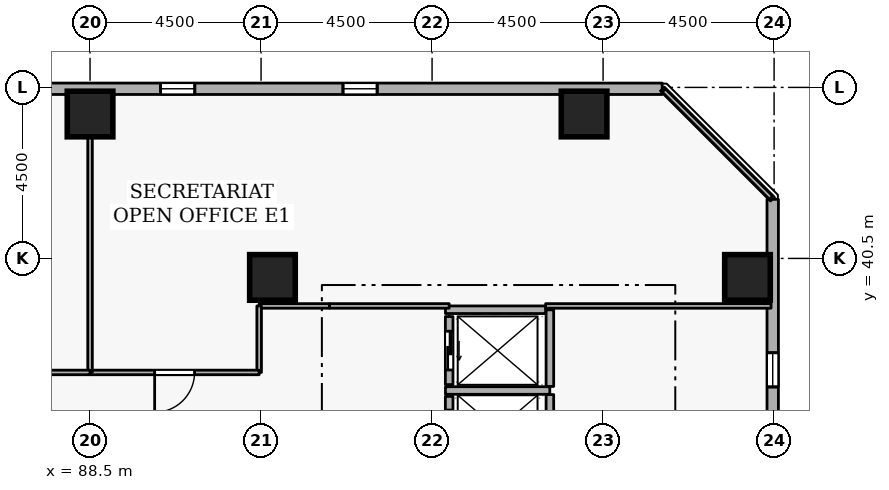
"""IFC4 building model, lengths in metres.
Left out: names, types, materials, properties, quantities, classifications, styles, units other than length and angle.
Written with IfcOpenShell. Run it as: python <this file> out.ifc"""

import sys

from ifc_helpers import new_model, si_unit, direction, frame, frame_2d, origin, origin_2d, place, context, subcontext, project, spatial, rectangle, extrude, element, fill, save


model = new_model("IFC4")
c1 = context("Model", 3, precision=1e-05, world=origin(), true_north=direction((0.0, 1.0)))
c2 = subcontext(c1, "Body", "Model", "MODEL_VIEW")
j1 = project(units=[si_unit("LENGTHUNIT", "METRE"), si_unit("PLANEANGLEUNIT", "RADIAN")], contexts=[c1])
p1 = place(None, origin())
s1 = spatial("IfcSite", under=j1, at=p1, CompositionType="ELEMENT")
p2 = place(p1, origin())
s2 = spatial("IfcBuilding", under=s1, at=p2, CompositionType="ELEMENT")
p3 = place(p2, frame((0.0, 0.0, 112.5)))
s3 = spatial("IfcBuildingStorey", under=s2, at=p3, CompositionType="ELEMENT", Elevation=112.5)
for number, where, z_axis, x_axis in (
    (1, (105.8, 40.0, 0.0), (0.0, 0.0, 1.0), (1.0, 0.0, 0.0)),
    (2, (101.5, 44.3, 0.0), (0.0, 0.0, 1.0), (1.0, 0.0, 0.0)),
    (3, (88.5, 44.3, 0.0), (0.0, 0.0, 1.0), (1.0, 0.0, 0.0)),
    (4, (93.3, 40.0, 0.0), (0.0, 0.0, 1.0), (1.0, 0.0, 0.0)),
):
    element("IfcColumn", number, at=place(p3, frame(where, z_axis=z_axis, x_axis=x_axis)), inside=s3, PredefinedType="COLUMN", context=c2, shape_type="SweptSolid", body=[
        extrude(rectangle(XDim=1.2, YDim=1.2, at=origin_2d()), origin(), (0.0, 0.0, 1.0), 3.6),
    ])
p4 = place(p3, frame((106.465, 5.619, 0.0), z_axis=(0.0, 0.0, 1.0), x_axis=(-2.6801568e-05, 0.999999999641, 0.0)))
e5 = element("IfcWall", 5, at=p4, inside=s3, PredefinedType="STANDARD", context=c2, shape_type="SweptSolid", body=[
    extrude(rectangle(XDim=36.437, YDim=0.3, at=frame_2d((18.218, 0.0))), origin(), (0.0, 0.0, 1.0), 2.7),
])
p5 = place(p4, frame((2.7, 0.0, 0.72)))
e6 = element("IfcOpeningElement", 6, at=p5, cuts=e5, PredefinedType="OPENING", context=c2, shape_type="SweptSolid", body=[
    extrude(rectangle(XDim=0.9, YDim=1.75, at=frame_2d((0.45, 0.875))), frame((0.0, 0.16, 0.0), z_axis=(0.0, -1.0, 0.0), x_axis=(1.0, 0.0, 0.0)), (0.0, 0.0, 1.0), 0.32),
])
p6 = place(p4, frame((12.3, 0.0, 0.72)))
e7 = element("IfcOpeningElement", 7, at=p6, cuts=e5, PredefinedType="OPENING", context=c2, shape_type="SweptSolid", body=[
    extrude(rectangle(XDim=0.9, YDim=1.75, at=frame_2d((0.45, 0.875))), frame((0.0, 0.16, 0.0), z_axis=(0.0, -1.0, 0.0), x_axis=(1.0, 0.0, 0.0)), (0.0, 0.0, 1.0), 0.32),
])
p7 = place(p4, frame((17.1, 0.0, 0.72)))
e8 = element("IfcOpeningElement", 8, at=p7, cuts=e5, PredefinedType="OPENING", context=c2, shape_type="SweptSolid", body=[
    extrude(rectangle(XDim=0.9, YDim=1.75, at=frame_2d((0.45, 0.875))), frame((0.0, 0.16, 0.0), z_axis=(0.0, -1.0, 0.0), x_axis=(1.0, 0.0, 0.0)), (0.0, 0.0, 1.0), 0.32),
])
p8 = place(p4, frame((26.7, 0.0, 0.72)))
e9 = element("IfcOpeningElement", 9, at=p8, cuts=e5, PredefinedType="OPENING", context=c2, shape_type="SweptSolid", body=[
    extrude(rectangle(XDim=0.9, YDim=1.75, at=frame_2d((0.45, 0.875))), frame((0.0, 0.16, 0.0), z_axis=(0.0, -1.0, 0.0), x_axis=(1.0, 0.0, 0.0)), (0.0, 0.0, 1.0), 0.32),
])
p9 = place(p4, frame((31.5, 0.0, 0.72)))
e10 = element("IfcOpeningElement", 10, at=p9, cuts=e5, PredefinedType="OPENING", context=c2, shape_type="SweptSolid", body=[
    extrude(rectangle(XDim=0.9, YDim=1.75, at=frame_2d((0.45, 0.875))), frame((0.0, 0.16, 0.0), z_axis=(0.0, -1.0, 0.0), x_axis=(1.0, 0.0, 0.0)), (0.0, 0.0, 1.0), 0.32),
])
p10 = place(p3, frame((103.555, 44.964, 0.0), z_axis=(0.0, 0.0, 1.0), x_axis=(-0.999999999641, 2.6801568e-05, 0.0)))
e11 = element("IfcWall", 11, at=p10, inside=s3, PredefinedType="STANDARD", context=c2, shape_type="SweptSolid", body=[
    extrude(rectangle(XDim=36.437, YDim=0.3, at=frame_2d((18.218, 0.0))), origin(), (0.0, 0.0, 1.0), 2.7),
])
p11 = place(p10, frame((7.5, 0.0, 0.72)))
e12 = element("IfcOpeningElement", 12, at=p11, cuts=e11, PredefinedType="OPENING", context=c2, shape_type="SweptSolid", body=[
    extrude(rectangle(XDim=0.9, YDim=1.75, at=frame_2d((0.45, 0.875))), frame((0.0, 0.16, 0.0), z_axis=(0.0, -1.0, 0.0), x_axis=(1.0, 0.0, 0.0)), (0.0, 0.0, 1.0), 0.32),
])
p12 = place(p10, frame((12.3, 0.0, 0.72)))
e13 = element("IfcOpeningElement", 13, at=p12, cuts=e11, PredefinedType="OPENING", context=c2, shape_type="SweptSolid", body=[
    extrude(rectangle(XDim=0.9, YDim=1.75, at=frame_2d((0.45, 0.875))), frame((0.0, 0.16, 0.0), z_axis=(0.0, -1.0, 0.0), x_axis=(1.0, 0.0, 0.0)), (0.0, 0.0, 1.0), 0.32),
])
p13 = place(p10, frame((21.9, 0.0, 0.72)))
e14 = element("IfcOpeningElement", 14, at=p13, cuts=e11, PredefinedType="OPENING", context=c2, shape_type="SweptSolid", body=[
    extrude(rectangle(XDim=0.9, YDim=1.75, at=frame_2d((0.45, 0.875))), frame((0.0, 0.16, 0.0), z_axis=(0.0, -1.0, 0.0), x_axis=(1.0, 0.0, 0.0)), (0.0, 0.0, 1.0), 0.32),
])
p14 = place(p10, frame((31.5, 0.0, 0.72)))
e15 = element("IfcOpeningElement", 15, at=p14, cuts=e11, PredefinedType="OPENING", context=c2, shape_type="SweptSolid", body=[
    extrude(rectangle(XDim=0.9, YDim=1.75, at=frame_2d((0.45, 0.875))), frame((0.0, 0.16, 0.0), z_axis=(0.0, -1.0, 0.0), x_axis=(1.0, 0.0, 0.0)), (0.0, 0.0, 1.0), 0.32),
])
p15 = place(p3, frame((97.95, 36.87, 0.0), z_axis=(0.0, 0.0, 1.0), x_axis=(0.0, -1.0, 0.0)))
e16 = element("IfcWall", 16, at=p15, inside=s3, PredefinedType="STANDARD", context=c2, shape_type="SweptSolid", body=[
    extrude(rectangle(XDim=1.74, YDim=0.2, at=frame_2d((0.87, 0.0))), origin(), (0.0, 0.0, 1.0), 3.34),
])
p16 = place(p15, frame((0.36, 0.0, 0.0)))
e17 = element("IfcOpeningElement", 17, at=p16, cuts=e16, PredefinedType="OPENING", context=c2, shape_type="SweptSolid", body=[
    extrude(rectangle(XDim=1.02, YDim=2.06, at=frame_2d((0.51, 1.03))), frame((0.0, 0.11, 0.0), z_axis=(0.0, -1.0, 0.0), x_axis=(1.0, 0.0, 0.0)), (0.0, 0.0, 1.0), 0.22),
])
p17 = place(p3, frame((97.95, 38.97, 0.0), z_axis=(0.0, 0.0, 1.0), x_axis=(0.0, -1.0, 0.0)))
e18 = element("IfcWall", 18, at=p17, inside=s3, PredefinedType="STANDARD", context=c2, shape_type="SweptSolid", body=[
    extrude(rectangle(XDim=1.79, YDim=0.2, at=frame_2d((0.895, 0.0))), origin(), (0.0, 0.0, 1.0), 3.34),
])
p18 = place(p17, frame((0.385, 0.0, 0.0)))
e19 = element("IfcOpeningElement", 19, at=p18, cuts=e18, PredefinedType="OPENING", context=c2, shape_type="SweptSolid", body=[
    extrude(rectangle(XDim=1.02, YDim=2.06, at=frame_2d((0.51, 1.03))), frame((0.0, 0.11, 0.0), z_axis=(0.0, -1.0, 0.0), x_axis=(1.0, 0.0, 0.0)), (0.0, 0.0, 1.0), 0.22),
])
p19 = place(p3, frame((97.852, 37.025, 0.0), z_axis=(0.0, 0.0, 1.0), x_axis=(1.0, 0.0, 0.0)))
e20 = element("IfcWall", 20, at=p19, inside=s3, PredefinedType="STANDARD", context=c2, shape_type="SweptSolid", body=[
    extrude(rectangle(XDim=2.746, YDim=0.2, at=frame_2d((1.373, 0.0))), origin(), (0.0, 0.0, 1.0), 3.34),
])
p20 = place(p3, frame((100.6, 35.062, 0.0), z_axis=(0.0, 0.0, 1.0), x_axis=(0.0, 1.0, 0.0)))
e21 = element("IfcWall", 21, at=p20, inside=s3, PredefinedType="STANDARD", context=c2, shape_type="SweptSolid", body=[
    extrude(rectangle(XDim=1.856, YDim=0.2, at=frame_2d((0.928, 0.0))), origin(), (0.0, 0.0, 1.0), 3.34),
])
p21 = place(p3, frame((100.6, 37.132, 0.0), z_axis=(0.0, 0.0, 1.0), x_axis=(0.0, 1.0, 0.0)))
e22 = element("IfcWall", 22, at=p21, inside=s3, PredefinedType="STANDARD", context=c2, shape_type="SweptSolid", body=[
    extrude(rectangle(XDim=2.016, YDim=0.2, at=frame_2d((1.008, 0.0))), origin(), (0.0, 0.0, 1.0), 3.34),
])
p22 = place(p3, frame((97.852, 39.15, 0.0), z_axis=(0.0, 0.0, 1.0), x_axis=(1.0, 0.0, 0.0)))
e23 = element("IfcWall", 23, at=p22, inside=s3, PredefinedType="STANDARD", context=c2, shape_type="SweptSolid", body=[
    extrude(rectangle(XDim=2.636, YDim=0.2, at=frame_2d((1.318, 0.0))), origin(), (0.0, 0.0, 1.0), 3.34),
])
p23 = place(p3, frame((106.42, 39.25, 0.0), z_axis=(0.0, 0.0, 1.0), x_axis=(-1.0, 0.0, 0.0)))
e24 = element("IfcWall", 24, at=p23, inside=s3, PredefinedType="PARTITIONING", context=c2, shape_type="SweptSolid", body=[
    extrude(rectangle(XDim=5.932, YDim=0.12, at=frame_2d((2.966, 0.0))), origin(), (0.0, 0.0, 1.0), 3.34),
])
p24 = place(p3, frame((97.95, 39.25, 0.0), z_axis=(0.0, 0.0, 1.0), x_axis=(-1.0, 0.0, 0.0)))
e25 = element("IfcWall", 25, at=p24, inside=s3, PredefinedType="PARTITIONING", context=c2, shape_type="SweptSolid", body=[
    extrude(rectangle(XDim=3.15, YDim=0.12, at=frame_2d((1.575, 0.0))), origin(), (0.0, 0.0, 1.0), 3.34),
])
p25 = place(p3, frame((94.8, 39.25, 0.0), z_axis=(0.0, 0.0, 1.0), x_axis=(-1.0, 0.0, 0.0)))
e26 = element("IfcWall", 26, at=p25, inside=s3, PredefinedType="PARTITIONING", context=c2, shape_type="SweptSolid", body=[
    extrude(rectangle(XDim=1.85, YDim=0.12, at=frame_2d((0.925, 0.0))), origin(), (0.0, 0.0, 1.0), 3.34),
])
p26 = place(p3, frame((92.95, 39.25, 0.0), z_axis=(0.0, 0.0, 1.0), x_axis=(0.0, -1.0, 0.0)))
e27 = element("IfcWall", 27, at=p26, inside=s3, PredefinedType="PARTITIONING", context=c2, shape_type="SweptSolid", body=[
    extrude(rectangle(XDim=1.75, YDim=0.12, at=frame_2d((0.875, 0.0))), origin(), (0.0, 0.0, 1.0), 3.34),
])
p27 = place(p3, frame((92.95, 37.5, 0.0), z_axis=(0.0, 0.0, 1.0), x_axis=(-1.0, 0.0, 0.0)))
e28 = element("IfcWall", 28, at=p27, inside=s3, PredefinedType="PARTITIONING", context=c2, shape_type="SweptSolid", body=[
    extrude(rectangle(XDim=4.45, YDim=0.12, at=frame_2d((2.225, 0.0))), origin(), (0.0, 0.0, 1.0), 3.34),
])
p28 = place(p27, frame((1.7, 0.0, 0.0)))
e29 = element("IfcOpeningElement", 29, at=p28, cuts=e28, PredefinedType="OPENING", context=c2, shape_type="SweptSolid", body=[
    extrude(rectangle(XDim=1.05, YDim=2.1, at=frame_2d((0.525, 1.05))), frame((0.0, 0.07, 0.0), z_axis=(0.0, -1.0, 0.0), x_axis=(1.0, 0.0, 0.0)), (0.0, 0.0, 1.0), 0.14),
])
p29 = place(p3, frame((88.5, 37.5, 0.0), z_axis=(0.0, 0.0, 1.0), x_axis=(0.0, 1.0, 0.0)))
e30 = element("IfcWall", 30, at=p29, inside=s3, PredefinedType="PARTITIONING", context=c2, shape_type="SweptSolid", body=[
    extrude(rectangle(XDim=7.42, YDim=0.12, at=frame_2d((3.71, 0.0))), origin(), (0.0, 0.0, 1.0), 2.882),
])
p30 = place(p3, frame((103.598, 44.92, 0.0), z_axis=(0.0, 0.0, 1.0), x_axis=(0.707106781187, -0.707106781187, 0.0)))
e31 = element("IfcWall", 31, at=p30, inside=s3, PredefinedType="PARTITIONING", context=c2, shape_type="SweptSolid", body=[
    extrude(rectangle(XDim=3.99, YDim=0.12, at=frame_2d((1.995, 0.0))), origin(), (0.0, 0.0, 1.0), 3.34),
])
p31 = place(p3, frame((88.5, 37.5, 0.0), z_axis=(0.0, 0.0, 1.0), x_axis=(-1.0, 0.0, 0.0)))
e32 = element("IfcWall", 32, at=p31, inside=s3, PredefinedType="PARTITIONING", context=c2, shape_type="SweptSolid", body=[
    extrude(rectangle(XDim=3.15, YDim=0.12, at=frame_2d((1.575, 0.0))), origin(), (0.0, 0.0, 1.0), 3.34),
])
p32 = place(p31, frame((1.1, 0.0, 0.0)))
e33 = element("IfcOpeningElement", 33, at=p32, cuts=e32, PredefinedType="OPENING", context=c2, shape_type="SweptSolid", body=[
    extrude(rectangle(XDim=0.95, YDim=2.1, at=frame_2d((0.475, 1.05))), frame((0.0, 0.07, 0.0), z_axis=(0.0, -1.0, 0.0), x_axis=(1.0, 0.0, 0.0)), (0.0, 0.0, 1.0), 0.14),
])
p33 = place(p9, origin())
e34 = element("IfcWindow", 34, at=p33, inside=s3, PartitioningType="SINGLE_PANEL", PredefinedType="WINDOW", context=c2, shape_type="SweptSolid", body=[
    extrude(rectangle(XDim=0.9, YDim=1.75, at=frame_2d((0.45, 0.875))), frame((0.0, 0.03, 0.0), z_axis=(0.0, -1.0, 0.0), x_axis=(1.0, 0.0, 0.0)), (0.0, 0.0, 1.0), 0.06),
])
fill(e10, e34)
p34 = place(p11, origin())
e35 = element("IfcWindow", 35, at=p34, inside=s3, PartitioningType="SINGLE_PANEL", PredefinedType="WINDOW", context=c2, shape_type="SweptSolid", body=[
    extrude(rectangle(XDim=0.9, YDim=1.75, at=frame_2d((0.45, 0.875))), frame((0.0, 0.03, 0.0), z_axis=(0.0, -1.0, 0.0), x_axis=(1.0, 0.0, 0.0)), (0.0, 0.0, 1.0), 0.06),
])
fill(e12, e35)
p35 = place(p12, origin())
e36 = element("IfcWindow", 36, at=p35, inside=s3, PartitioningType="SINGLE_PANEL", PredefinedType="WINDOW", context=c2, shape_type="SweptSolid", body=[
    extrude(rectangle(XDim=0.9, YDim=1.75, at=frame_2d((0.45, 0.875))), frame((0.0, 0.03, 0.0), z_axis=(0.0, -1.0, 0.0), x_axis=(1.0, 0.0, 0.0)), (0.0, 0.0, 1.0), 0.06),
])
fill(e13, e36)
p36 = place(p16, origin())
e37 = element("IfcDoor", 37, at=p36, inside=s3, OperationType="SLIDING_TO_LEFT", PredefinedType="DOOR", context=c2, shape_type="SweptSolid", body=[
    extrude(rectangle(XDim=1.02, YDim=2.06, at=frame_2d((0.51, 1.03))), frame((0.0, 0.025, 0.0), z_axis=(0.0, -1.0, 0.0), x_axis=(1.0, 0.0, 0.0)), (0.0, 0.0, 1.0), 0.05),
])
fill(e17, e37)
p37 = place(p18, origin())
e38 = element("IfcDoor", 38, at=p37, inside=s3, OperationType="SLIDING_TO_LEFT", PredefinedType="DOOR", context=c2, shape_type="SweptSolid", body=[
    extrude(rectangle(XDim=1.02, YDim=2.06, at=frame_2d((0.51, 1.03))), frame((0.0, 0.025, 0.0), z_axis=(0.0, -1.0, 0.0), x_axis=(1.0, 0.0, 0.0)), (0.0, 0.0, 1.0), 0.05),
])
fill(e19, e38)
p38 = place(p28, origin())
e39 = element("IfcDoor", 39, at=p38, inside=s3, OperationType="SINGLE_SWING_RIGHT", PredefinedType="DOOR", context=c2, shape_type="SweptSolid", body=[
    extrude(rectangle(XDim=1.05, YDim=2.1, at=frame_2d((0.525, 1.05))), frame((0.0, 0.025, 0.0), z_axis=(0.0, -1.0, 0.0), x_axis=(1.0, 0.0, 0.0)), (0.0, 0.0, 1.0), 0.05),
])
fill(e29, e39)
save(model, sys.argv[1])
